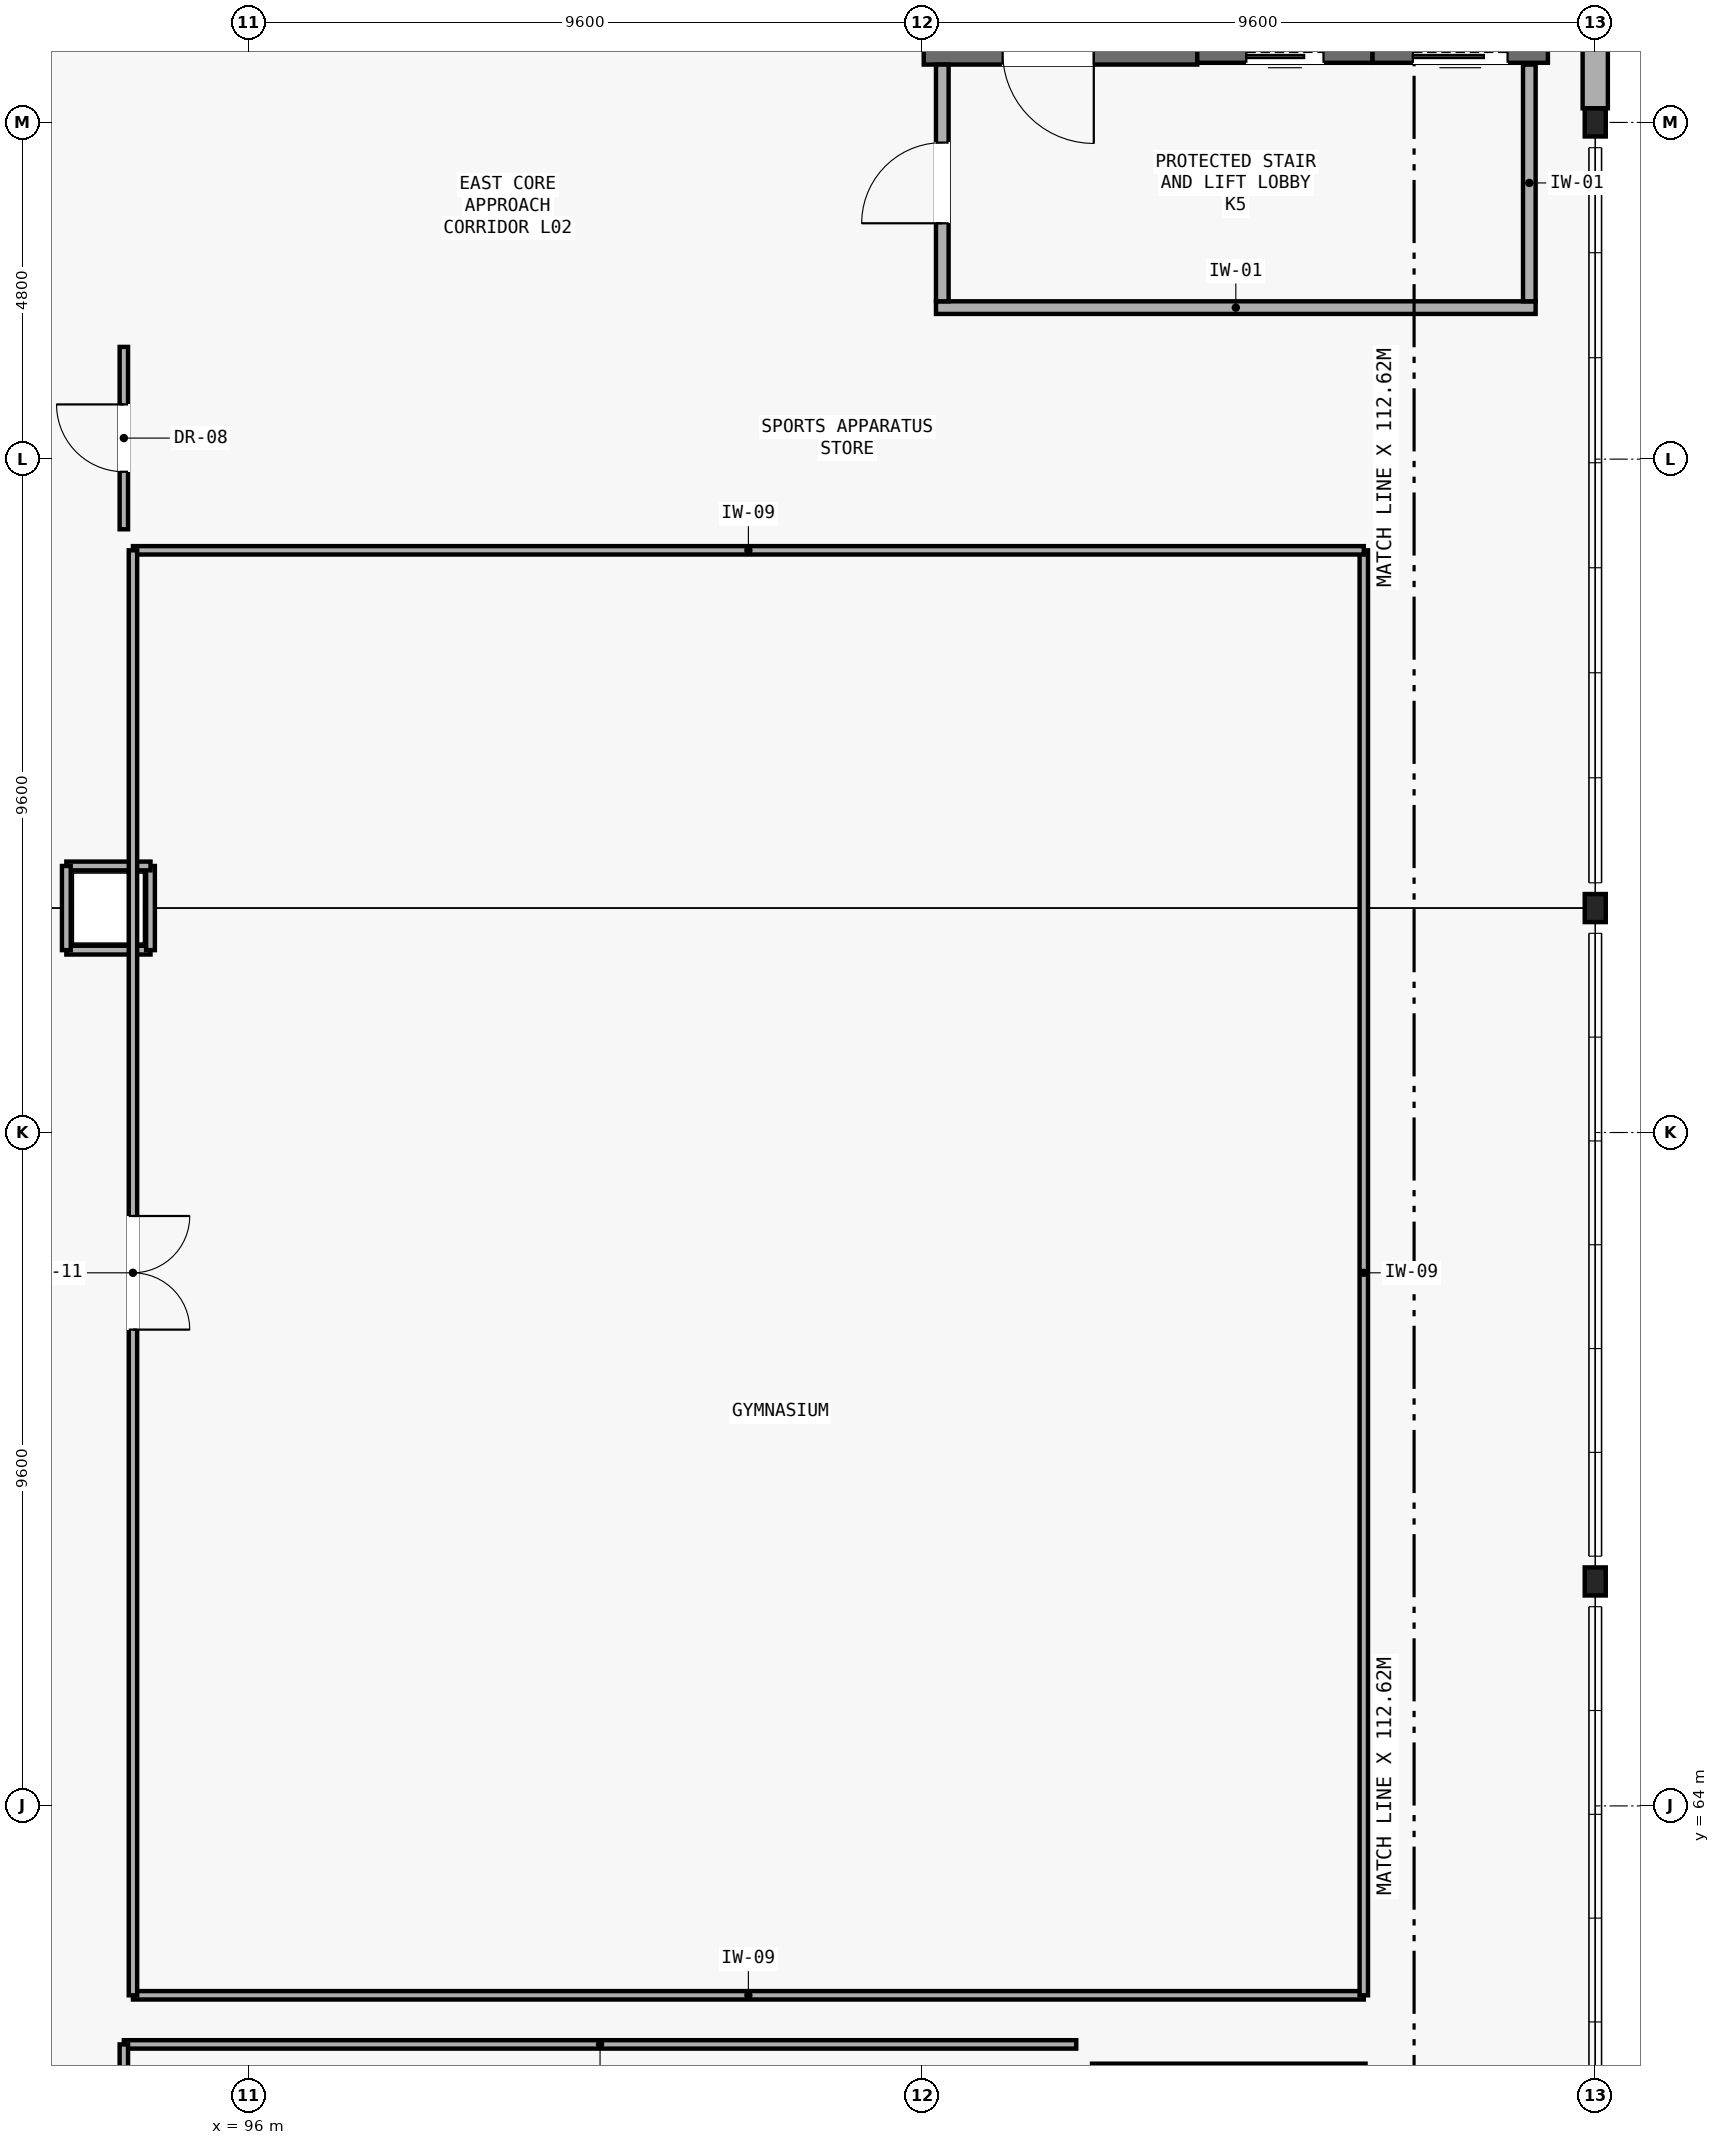
"""IFC4 building model, lengths in metres.
Left out: names, types, materials, properties, quantities, classifications, styles, units other than length and angle.
Written with IfcOpenShell. Run it as: python <this file> out.ifc"""

import sys

from ifc_helpers import new_model, si_unit, direction, frame, frame_2d, origin, origin_2d, place, context, subcontext, project, spatial, rectangle, i_section, extrude, element, fill, save


model = new_model("IFC4")
c1 = context("Model", 3, precision=1e-05, world=origin(), true_north=direction((0.0, 1.0)))
c2 = subcontext(c1, "Body", "Model", "MODEL_VIEW")
j1 = project(units=[si_unit("LENGTHUNIT", "METRE"), si_unit("PLANEANGLEUNIT", "RADIAN")], contexts=[c1])
p1 = place(None, origin())
s1 = spatial("IfcSite", under=j1, at=p1, CompositionType="ELEMENT")
p2 = place(p1, origin())
s2 = spatial("IfcBuilding", under=s1, at=p2, CompositionType="ELEMENT")
p3 = place(p2, frame((0.0, 0.0, 9.45)))
s3 = spatial("IfcBuildingStorey", under=s2, at=p3, CompositionType="ELEMENT", Elevation=9.45)
for number, where, z_axis, x_axis in (
    (1, (115.2, 67.2, 0.0), (0.0, 0.0, 1.0), (1.0, 0.0, 0.0)),
    (2, (115.2, 76.8, 0.0), (0.0, 0.0, 1.0), (1.0, 0.0, 0.0)),
    (3, (115.2, 88.0, 0.0), (0.0, 0.0, 1.0), (1.0, 0.0, 0.0)),
):
    element("IfcColumn", number, at=place(p3, frame(where, z_axis=z_axis, x_axis=x_axis)), inside=s3, PredefinedType="COLUMN", context=c2, shape_type="SweptSolid", body=[
        extrude(i_section(OverallWidth=0.3, OverallDepth=0.4, WebThickness=0.013, FlangeThickness=0.024, FilletRadius=0.027, at=origin_2d()), origin(), (0.0, 0.0, 1.0), 4.2),
    ])
p4 = place(p3, frame((115.2, 88.202, 0.0), z_axis=(0.0, 0.0, 1.0), x_axis=(0.0, 1.0, 0.0)))
e4 = element("IfcWall", 4, at=p4, inside=s3, PredefinedType="SOLIDWALL", context=c2, shape_type="SweptSolid", body=[
    extrude(rectangle(XDim=9.196, YDim=0.36, at=frame_2d((4.598, 0.0))), origin(), (0.0, 0.0, 1.0), 3.51),
])
p5 = place(p3, frame((105.625, 89.0, 0.0), z_axis=(0.0, 0.0, 1.0), x_axis=(1.0, 0.0, 0.0)))
e5 = element("IfcWall", 5, at=p5, inside=s3, PredefinedType="SHEAR", context=c2, shape_type="SweptSolid", body=[
    extrude(rectangle(XDim=3.9, YDim=0.35, at=frame_2d((1.95, 0.0))), origin(), (0.0, 0.0, 1.0), 3.97),
])
p6 = place(p5, frame((1.125, 0.0, 0.0)))
e6 = element("IfcOpeningElement", 6, at=p6, cuts=e5, PredefinedType="OPENING", context=c2, shape_type="SweptSolid", body=[
    extrude(rectangle(XDim=1.3, YDim=2.15, at=frame_2d((0.65, 1.075))), frame((0.0, 0.185, 0.0), z_axis=(0.0, -1.0, 0.0), x_axis=(1.0, 0.0, 0.0)), (0.0, 0.0, 1.0), 0.37),
])
p7 = place(p3, frame((109.525, 89.0, 0.0), z_axis=(0.0, 0.0, 1.0), x_axis=(1.0, 0.0, 0.0)))
e7 = element("IfcWall", 7, at=p7, inside=s3, PredefinedType="SHEAR", context=c2, shape_type="SweptSolid", body=[
    extrude(rectangle(XDim=2.5, YDim=0.3, at=frame_2d((1.25, 0.0))), origin(), (0.0, 0.0, 1.0), 3.97),
])
p8 = place(p7, frame((0.7, 0.0, 0.0)))
e8 = element("IfcOpeningElement", 8, at=p8, cuts=e7, PredefinedType="OPENING", context=c2, shape_type="SweptSolid", body=[
    extrude(rectangle(XDim=1.1, YDim=2.1, at=frame_2d((0.55, 1.05))), frame((0.0, 0.16, 0.0), z_axis=(0.0, -1.0, 0.0), x_axis=(1.0, 0.0, 0.0)), (0.0, 0.0, 1.0), 0.32),
])
p9 = place(p3, frame((112.025, 89.0, 0.0), z_axis=(0.0, 0.0, 1.0), x_axis=(1.0, 0.0, 0.0)))
e9 = element("IfcWall", 9, at=p9, inside=s3, PredefinedType="SHEAR", context=c2, shape_type="SweptSolid", body=[
    extrude(rectangle(XDim=2.5, YDim=0.3, at=frame_2d((1.25, 0.0))), origin(), (0.0, 0.0, 1.0), 3.97),
])
p10 = place(p9, frame((0.575, 0.0, 0.0)))
e10 = element("IfcOpeningElement", 10, at=p10, cuts=e9, PredefinedType="OPENING", context=c2, shape_type="SweptSolid", body=[
    extrude(rectangle(XDim=1.35, YDim=2.15, at=frame_2d((0.675, 1.075))), frame((0.0, 0.16, 0.0), z_axis=(0.0, -1.0, 0.0), x_axis=(1.0, 0.0, 0.0)), (0.0, 0.0, 1.0), 0.32),
])
p11 = place(p3, frame((105.8, 85.36, 0.0), z_axis=(0.0, 0.0, 1.0), x_axis=(1.0, 0.0, 0.0)))
e11 = element("IfcWall", 11, at=p11, inside=s3, PredefinedType="PARTITIONING", context=c2, shape_type="SweptSolid", body=[
    extrude(rectangle(XDim=8.55, YDim=0.18, at=frame_2d((4.275, 0.0))), origin(), (0.0, 0.0, 1.0), 3.97),
])
p12 = place(p3, frame((105.89, 85.45, 0.0), z_axis=(0.0, 0.0, 1.0), x_axis=(0.0, 1.0, 0.0)))
e12 = element("IfcWall", 12, at=p12, inside=s3, PredefinedType="PARTITIONING", context=c2, shape_type="SweptSolid", body=[
    extrude(rectangle(XDim=3.375, YDim=0.18, at=frame_2d((1.688, 0.0))), origin(), (0.0, 0.0, 1.0), 3.97),
])
p13 = place(p12, frame((1.113, 0.0, 0.0)))
e13 = element("IfcOpeningElement", 13, at=p13, cuts=e12, PredefinedType="OPENING", context=c2, shape_type="SweptSolid", body=[
    extrude(rectangle(XDim=1.15, YDim=2.15, at=frame_2d((0.575, 1.075))), frame((0.0, 0.1, 0.0), z_axis=(0.0, -1.0, 0.0), x_axis=(1.0, 0.0, 0.0)), (0.0, 0.0, 1.0), 0.2),
])
p14 = place(p3, frame((114.26, 85.45, 0.0), z_axis=(0.0, 0.0, 1.0), x_axis=(0.0, 1.0, 0.0)))
e14 = element("IfcWall", 14, at=p14, inside=s3, PredefinedType="PARTITIONING", context=c2, shape_type="SweptSolid", body=[
    extrude(rectangle(XDim=3.375, YDim=0.18, at=frame_2d((1.688, 0.0))), origin(), (0.0, 0.0, 1.0), 3.97),
])
p15 = place(p3, frame((108.025, 60.15, 0.0), z_axis=(0.0, 0.0, 1.0), x_axis=(1.0, 0.0, 0.0)))
e15 = element("IfcWall", 15, at=p15, inside=s3, PredefinedType="SHEAR", context=c2, shape_type="SweptSolid", body=[
    extrude(rectangle(XDim=3.9, YDim=0.35, at=frame_2d((1.95, 0.0))), origin(), (0.0, 0.0, 1.0), 3.97),
])
p16 = place(p3, frame((93.4, 76.2, 0.0), z_axis=(0.0, 0.0, 1.0), x_axis=(1.0, 0.0, 0.0)))
e16 = element("IfcWall", 16, at=p16, inside=s3, PredefinedType="PARTITIONING", context=c2, shape_type="SweptSolid", body=[
    extrude(rectangle(XDim=1.2, YDim=0.125, at=frame_2d((0.6, 0.0))), origin(), (0.0, 0.0, 1.0), 3.97),
])
p17 = place(p3, frame((94.6, 76.2, 0.0), z_axis=(0.0, 0.0, 1.0), x_axis=(0.0, 1.0, 0.0)))
e17 = element("IfcWall", 17, at=p17, inside=s3, PredefinedType="PARTITIONING", context=c2, shape_type="SweptSolid", body=[
    extrude(rectangle(XDim=1.2, YDim=0.125, at=frame_2d((0.6, 0.0))), origin(), (0.0, 0.0, 1.0), 3.97),
])
p18 = place(p3, frame((94.6, 77.4, 0.0), z_axis=(0.0, 0.0, 1.0), x_axis=(-1.0, 0.0, 0.0)))
e18 = element("IfcWall", 18, at=p18, inside=s3, PredefinedType="PARTITIONING", context=c2, shape_type="SweptSolid", body=[
    extrude(rectangle(XDim=1.2, YDim=0.125, at=frame_2d((0.6, 0.0))), origin(), (0.0, 0.0, 1.0), 3.97),
])
p19 = place(p3, frame((93.4, 77.4, 0.0), z_axis=(0.0, 0.0, 1.0), x_axis=(0.0, -1.0, 0.0)))
e19 = element("IfcWall", 19, at=p19, inside=s3, PredefinedType="PARTITIONING", context=c2, shape_type="SweptSolid", body=[
    extrude(rectangle(XDim=1.2, YDim=0.125, at=frame_2d((0.6, 0.0))), origin(), (0.0, 0.0, 1.0), 3.97),
])
p20 = place(p3, frame((94.35, 61.3, 0.0), z_axis=(0.0, 0.0, 1.0), x_axis=(1.0, 0.0, 0.0)))
e20 = element("IfcWall", 20, at=p20, inside=s3, PredefinedType="PARTITIONING", context=c2, shape_type="SweptSolid", body=[
    extrude(rectangle(XDim=17.55, YDim=0.12, at=frame_2d((8.775, 0.0))), origin(), (0.0, 0.0, 1.0), 3.97),
])
p21 = place(p3, frame((111.9, 61.3, 0.0), z_axis=(0.0, 0.0, 1.0), x_axis=(0.0, 1.0, 0.0)))
e21 = element("IfcWall", 21, at=p21, inside=s3, PredefinedType="PARTITIONING", context=c2, shape_type="SweptSolid", body=[
    extrude(rectangle(XDim=20.6, YDim=0.12, at=frame_2d((10.3, 0.0))), origin(), (0.0, 0.0, 1.0), 3.97),
])
p22 = place(p3, frame((111.9, 81.9, 0.0), z_axis=(0.0, 0.0, 1.0), x_axis=(-1.0, 0.0, 0.0)))
e22 = element("IfcWall", 22, at=p22, inside=s3, PredefinedType="PARTITIONING", context=c2, shape_type="SweptSolid", body=[
    extrude(rectangle(XDim=17.55, YDim=0.12, at=frame_2d((8.775, 0.0))), origin(), (0.0, 0.0, 1.0), 3.97),
])
p23 = place(p3, frame((94.35, 81.9, 0.0), z_axis=(0.0, 0.0, 1.0), x_axis=(0.0, -1.0, 0.0)))
e23 = element("IfcWall", 23, at=p23, inside=s3, PredefinedType="PARTITIONING", context=c2, shape_type="SweptSolid", body=[
    extrude(rectangle(XDim=20.6, YDim=0.12, at=frame_2d((10.3, 0.0))), origin(), (0.0, 0.0, 1.0), 3.97),
])
p24 = place(p23, frame((9.49, 0.0, 0.0)))
e24 = element("IfcOpeningElement", 24, at=p24, cuts=e23, PredefinedType="OPENING", context=c2, shape_type="SweptSolid", body=[
    extrude(rectangle(XDim=1.62, YDim=2.2, at=frame_2d((0.81, 1.1))), frame((0.0, 0.07, 0.0), z_axis=(0.0, -1.0, 0.0), x_axis=(1.0, 0.0, 0.0)), (0.0, 0.0, 1.0), 0.14),
])
p25 = place(p3, frame((94.22, 84.8, 0.0), z_axis=(0.0, 0.0, 1.0), x_axis=(0.0, -1.0, 0.0)))
e25 = element("IfcWall", 25, at=p25, inside=s3, PredefinedType="PARTITIONING", context=c2, shape_type="SweptSolid", body=[
    extrude(rectangle(XDim=2.6, YDim=0.12, at=frame_2d((1.3, 0.0))), origin(), (0.0, 0.0, 1.0), 3.97),
])
p26 = place(p25, frame((0.82, 0.0, 0.0)))
e26 = element("IfcOpeningElement", 26, at=p26, cuts=e25, PredefinedType="OPENING", context=c2, shape_type="SweptSolid", body=[
    extrude(rectangle(XDim=0.96, YDim=2.08, at=frame_2d((0.48, 1.04))), frame((0.0, 0.07, 0.0), z_axis=(0.0, -1.0, 0.0), x_axis=(1.0, 0.0, 0.0)), (0.0, 0.0, 1.0), 0.14),
])
p27 = place(p3, frame((107.8, 60.6, 0.0), z_axis=(0.0, 0.0, 1.0), x_axis=(-1.0, 0.0, 0.0)))
e27 = element("IfcWall", 27, at=p27, inside=s3, PredefinedType="PARTITIONING", context=c2, shape_type="SweptSolid", body=[
    extrude(rectangle(XDim=13.58, YDim=0.12, at=frame_2d((6.79, 0.0))), origin(), (0.0, 0.0, 1.0), 3.5),
])
p28 = place(p3, frame((94.22, 60.6, 0.0), z_axis=(0.0, 0.0, 1.0), x_axis=(0.0, -1.0, 0.0)))
e28 = element("IfcWall", 28, at=p28, inside=s3, PredefinedType="PARTITIONING", context=c2, shape_type="SweptSolid", body=[
    extrude(rectangle(XDim=9.4, YDim=0.12, at=frame_2d((4.7, 0.0))), origin(), (0.0, 0.0, 1.0), 3.97),
])
p29 = place(p6, frame((1.3, 0.0, 0.0), z_axis=(0.0, 0.0, 1.0), x_axis=(-1.0, 0.0, 0.0)))
e29 = element("IfcDoor", 29, at=p29, inside=s3, OperationType="SINGLE_SWING_RIGHT", PredefinedType="DOOR", context=c2, shape_type="SweptSolid", body=[
    extrude(rectangle(XDim=1.3, YDim=2.15, at=frame_2d((0.65, 1.075))), frame((0.0, 0.025, 0.0), z_axis=(0.0, -1.0, 0.0), x_axis=(1.0, 0.0, 0.0)), (0.0, 0.0, 1.0), 0.05),
])
fill(e6, e29)
p30 = place(p8, frame((1.1, 0.0, 0.0), z_axis=(0.0, 0.0, 1.0), x_axis=(-1.0, 0.0, 0.0)))
e30 = element("IfcDoor", 30, at=p30, inside=s3, OperationType="SLIDING_TO_LEFT", PredefinedType="DOOR", context=c2, shape_type="SweptSolid", body=[
    extrude(rectangle(XDim=1.1, YDim=2.1, at=frame_2d((0.55, 1.05))), frame((0.0, 0.025, 0.0), z_axis=(0.0, -1.0, 0.0), x_axis=(1.0, 0.0, 0.0)), (0.0, 0.0, 1.0), 0.05),
])
fill(e8, e30)
p31 = place(p10, frame((1.35, 0.0, 0.0), z_axis=(0.0, 0.0, 1.0), x_axis=(-1.0, 0.0, 0.0)))
e31 = element("IfcDoor", 31, at=p31, inside=s3, OperationType="SLIDING_TO_RIGHT", PredefinedType="DOOR", context=c2, shape_type="SweptSolid", body=[
    extrude(rectangle(XDim=1.35, YDim=2.15, at=frame_2d((0.675, 1.075))), frame((0.0, 0.025, 0.0), z_axis=(0.0, -1.0, 0.0), x_axis=(1.0, 0.0, 0.0)), (0.0, 0.0, 1.0), 0.05),
])
fill(e10, e31)
p32 = place(p13, origin())
e32 = element("IfcDoor", 32, at=p32, inside=s3, OperationType="SINGLE_SWING_LEFT", PredefinedType="DOOR", context=c2, shape_type="SweptSolid", body=[
    extrude(rectangle(XDim=1.15, YDim=2.15, at=frame_2d((0.575, 1.075))), frame((0.0, 0.025, 0.0), z_axis=(0.0, -1.0, 0.0), x_axis=(1.0, 0.0, 0.0)), (0.0, 0.0, 1.0), 0.05),
])
fill(e13, e32)
p33 = place(p24, origin())
e33 = element("IfcDoor", 33, at=p33, inside=s3, OperationType="DOUBLE_DOOR_SINGLE_SWING", PredefinedType="DOOR", context=c2, shape_type="SweptSolid", body=[
    extrude(rectangle(XDim=1.62, YDim=2.2, at=frame_2d((0.81, 1.1))), frame((0.0, 0.025, 0.0), z_axis=(0.0, -1.0, 0.0), x_axis=(1.0, 0.0, 0.0)), (0.0, 0.0, 1.0), 0.05),
])
fill(e24, e33)
p34 = place(p26, frame((0.96, 0.0, 0.0), z_axis=(0.0, 0.0, 1.0), x_axis=(-1.0, 0.0, 0.0)))
e34 = element("IfcDoor", 34, at=p34, inside=s3, OperationType="SINGLE_SWING_LEFT", PredefinedType="DOOR", context=c2, shape_type="SweptSolid", body=[
    extrude(rectangle(XDim=0.96, YDim=2.08, at=frame_2d((0.48, 1.04))), frame((0.0, 0.025, 0.0), z_axis=(0.0, -1.0, 0.0), x_axis=(1.0, 0.0, 0.0)), (0.0, 0.0, 1.0), 0.05),
])
fill(e26, e34)
save(model, sys.argv[1])
